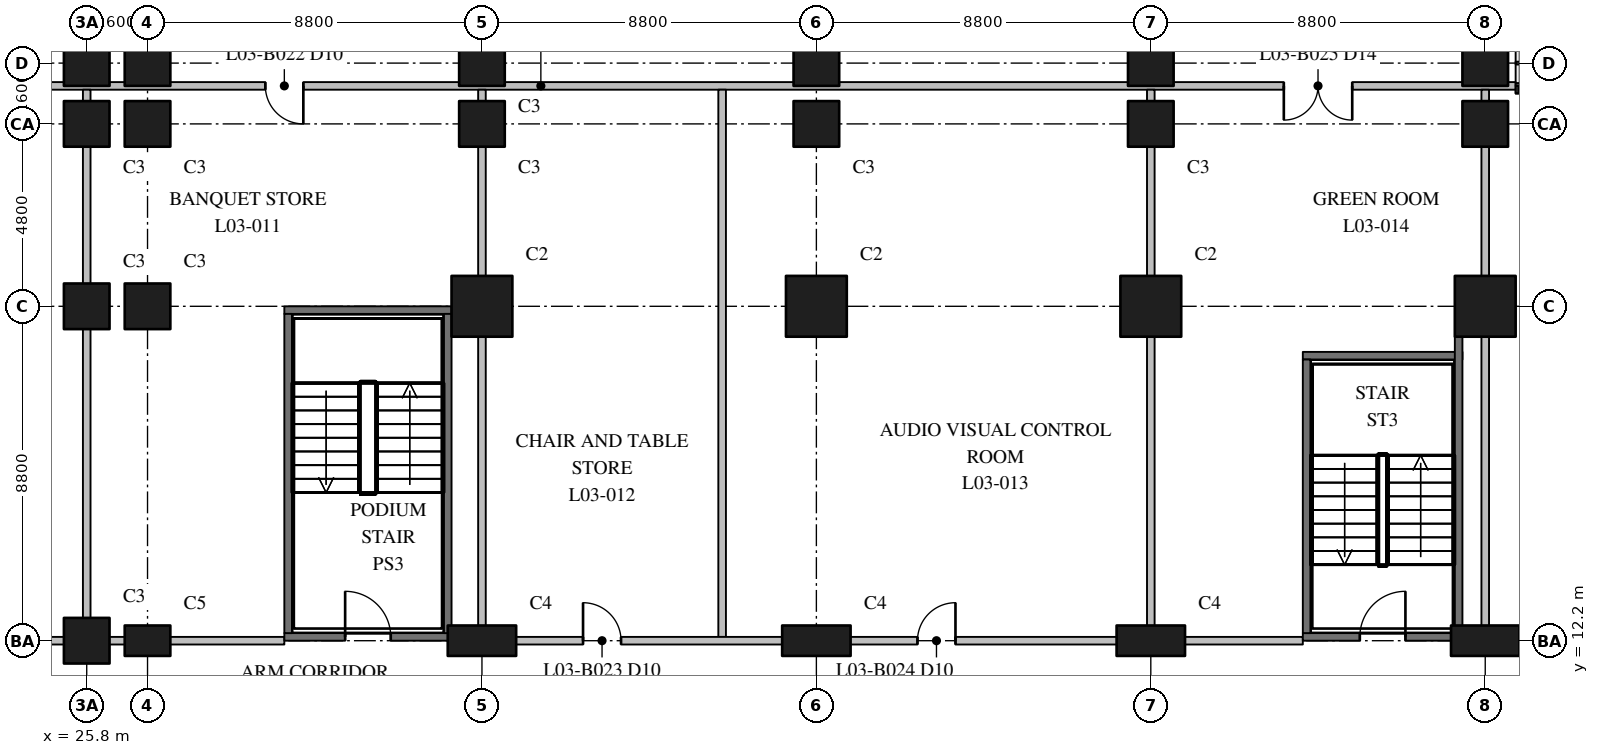
"""IFC4 building model, lengths in metres.
Left out: names, types, materials, properties, quantities, classifications, styles, units other than length and angle.
Written with IfcOpenShell. Run it as: python <this file> out.ifc"""

import sys

from ifc_helpers import new_model, si_unit, direction, frame, frame_2d, origin, origin_2d, place, context, subcontext, project, spatial, rectangle, extrude, element, fill, save


model = new_model("IFC4")
c1 = context("Model", 3, precision=1e-05, world=origin(), true_north=direction((0.0, 1.0)))
c2 = subcontext(c1, "Body", "Model", "MODEL_VIEW")
j1 = project(units=[si_unit("LENGTHUNIT", "METRE"), si_unit("PLANEANGLEUNIT", "RADIAN")], contexts=[c1])
p1 = place(None, origin())
s1 = spatial("IfcSite", under=j1, at=p1, CompositionType="ELEMENT")
p2 = place(p1, origin())
s2 = spatial("IfcBuilding", under=s1, at=p2, CompositionType="ELEMENT")
p3 = place(p2, frame((0.0, 0.0, 18.0)))
s3 = spatial("IfcBuildingStorey", under=s2, at=p3, CompositionType="ELEMENT", Elevation=18.0)
for number, where, z_axis, x_axis in (
    (1, (25.8, 12.2, 0.0), (0.0, 0.0, 1.0), (1.0, 0.0, 0.0)),
    (2, (25.8, 21.0, 0.0), (0.0, 0.0, 1.0), (1.0, 0.0, 0.0)),
    (3, (25.8, 25.8, 0.0), (0.0, 0.0, 1.0), (1.0, 0.0, 0.0)),
    (4, (25.8, 27.4, 0.0), (0.0, 0.0, 1.0), (1.0, 0.0, 0.0)),
):
    element("IfcColumn", number, at=place(p3, frame(where, z_axis=z_axis, x_axis=x_axis)), inside=s3, PredefinedType="COLUMN", context=c2, shape_type="SweptSolid", body=[
        extrude(rectangle(XDim=1.2, YDim=1.2, at=origin_2d()), origin(), (0.0, 0.0, 1.0), 5.5),
    ])
p4 = place(p3, frame((27.4, 12.2, 0.0), z_axis=(0.0, 0.0, 1.0), x_axis=(1.0, 0.0, 0.0)))
e5 = element("IfcColumn", 5, at=p4, inside=s3, PredefinedType="COLUMN", context=c2, shape_type="SweptSolid", body=[
    extrude(rectangle(XDim=1.2, YDim=0.8, at=origin_2d()), origin(), (0.0, 0.0, 1.0), 5.5),
])
for number, where, z_axis, x_axis in (
    (6, (27.4, 21.0, 0.0), (0.0, 0.0, 1.0), (1.0, 0.0, 0.0)),
    (7, (27.4, 25.8, 0.0), (0.0, 0.0, 1.0), (1.0, 0.0, 0.0)),
):
    element("IfcColumn", number, at=place(p3, frame(where, z_axis=z_axis, x_axis=x_axis)), inside=s3, PredefinedType="COLUMN", context=c2, shape_type="SweptSolid", body=[
        extrude(rectangle(XDim=1.2, YDim=1.2, at=origin_2d()), origin(), (0.0, 0.0, 1.0), 5.5),
    ])
p5 = place(p3, frame((36.2, 12.2, 0.0), z_axis=(0.0, 0.0, 1.0), x_axis=(1.0, 0.0, 0.0)))
e8 = element("IfcColumn", 8, at=p5, inside=s3, PredefinedType="COLUMN", context=c2, shape_type="SweptSolid", body=[
    extrude(rectangle(XDim=1.8, YDim=0.8, at=origin_2d()), origin(), (0.0, 0.0, 1.0), 5.5),
])
p6 = place(p3, frame((36.2, 21.0, 0.0), z_axis=(0.0, 0.0, 1.0), x_axis=(1.0, 0.0, 0.0)))
e9 = element("IfcColumn", 9, at=p6, inside=s3, PredefinedType="COLUMN", context=c2, shape_type="SweptSolid", body=[
    extrude(rectangle(XDim=1.6, YDim=1.6, at=origin_2d()), origin(), (0.0, 0.0, 1.0), 5.5),
])
p7 = place(p3, frame((36.2, 25.8, 0.0), z_axis=(0.0, 0.0, 1.0), x_axis=(1.0, 0.0, 0.0)))
e10 = element("IfcColumn", 10, at=p7, inside=s3, PredefinedType="COLUMN", context=c2, shape_type="SweptSolid", body=[
    extrude(rectangle(XDim=1.2, YDim=1.2, at=origin_2d()), origin(), (0.0, 0.0, 1.0), 5.5),
])
p8 = place(p3, frame((45.0, 12.2, 0.0), z_axis=(0.0, 0.0, 1.0), x_axis=(1.0, 0.0, 0.0)))
e11 = element("IfcColumn", 11, at=p8, inside=s3, PredefinedType="COLUMN", context=c2, shape_type="SweptSolid", body=[
    extrude(rectangle(XDim=1.8, YDim=0.8, at=origin_2d()), origin(), (0.0, 0.0, 1.0), 5.5),
])
p9 = place(p3, frame((45.0, 21.0, 0.0), z_axis=(0.0, 0.0, 1.0), x_axis=(1.0, 0.0, 0.0)))
e12 = element("IfcColumn", 12, at=p9, inside=s3, PredefinedType="COLUMN", context=c2, shape_type="SweptSolid", body=[
    extrude(rectangle(XDim=1.6, YDim=1.6, at=origin_2d()), origin(), (0.0, 0.0, 1.0), 5.5),
])
p10 = place(p3, frame((45.0, 25.8, 0.0), z_axis=(0.0, 0.0, 1.0), x_axis=(1.0, 0.0, 0.0)))
e13 = element("IfcColumn", 13, at=p10, inside=s3, PredefinedType="COLUMN", context=c2, shape_type="SweptSolid", body=[
    extrude(rectangle(XDim=1.2, YDim=1.2, at=origin_2d()), origin(), (0.0, 0.0, 1.0), 5.5),
])
p11 = place(p3, frame((53.8, 12.2, 0.0), z_axis=(0.0, 0.0, 1.0), x_axis=(1.0, 0.0, 0.0)))
e14 = element("IfcColumn", 14, at=p11, inside=s3, PredefinedType="COLUMN", context=c2, shape_type="SweptSolid", body=[
    extrude(rectangle(XDim=1.8, YDim=0.8, at=origin_2d()), origin(), (0.0, 0.0, 1.0), 5.5),
])
p12 = place(p3, frame((53.8, 21.0, 0.0), z_axis=(0.0, 0.0, 1.0), x_axis=(1.0, 0.0, 0.0)))
e15 = element("IfcColumn", 15, at=p12, inside=s3, PredefinedType="COLUMN", context=c2, shape_type="SweptSolid", body=[
    extrude(rectangle(XDim=1.6, YDim=1.6, at=origin_2d()), origin(), (0.0, 0.0, 1.0), 5.5),
])
p13 = place(p3, frame((53.8, 25.8, 0.0), z_axis=(0.0, 0.0, 1.0), x_axis=(1.0, 0.0, 0.0)))
e16 = element("IfcColumn", 16, at=p13, inside=s3, PredefinedType="COLUMN", context=c2, shape_type="SweptSolid", body=[
    extrude(rectangle(XDim=1.2, YDim=1.2, at=origin_2d()), origin(), (0.0, 0.0, 1.0), 5.5),
])
p14 = place(p3, frame((62.6, 12.2, 0.0), z_axis=(0.0, 0.0, 1.0), x_axis=(1.0, 0.0, 0.0)))
e17 = element("IfcColumn", 17, at=p14, inside=s3, PredefinedType="COLUMN", context=c2, shape_type="SweptSolid", body=[
    extrude(rectangle(XDim=1.8, YDim=0.8, at=origin_2d()), origin(), (0.0, 0.0, 1.0), 5.5),
])
p15 = place(p3, frame((62.6, 21.0, 0.0), z_axis=(0.0, 0.0, 1.0), x_axis=(1.0, 0.0, 0.0)))
e18 = element("IfcColumn", 18, at=p15, inside=s3, PredefinedType="COLUMN", context=c2, shape_type="SweptSolid", body=[
    extrude(rectangle(XDim=1.6, YDim=1.6, at=origin_2d()), origin(), (0.0, 0.0, 1.0), 5.5),
])
for number, where, z_axis, x_axis in (
    (19, (62.6, 25.8, 0.0), (0.0, 0.0, 1.0), (1.0, 0.0, 0.0)),
    (20, (27.4, 27.4, 0.0), (0.0, 0.0, 1.0), (1.0, 0.0, 0.0)),
    (21, (36.2, 27.4, 0.0), (0.0, 0.0, 1.0), (1.0, 0.0, 0.0)),
    (22, (45.0, 27.4, 0.0), (0.0, 0.0, 1.0), (1.0, 0.0, 0.0)),
    (23, (53.8, 27.4, 0.0), (0.0, 0.0, 1.0), (1.0, 0.0, 0.0)),
    (24, (62.6, 27.4, 0.0), (0.0, 0.0, 1.0), (1.0, 0.0, 0.0)),
):
    element("IfcColumn", number, at=place(p3, frame(where, z_axis=z_axis, x_axis=x_axis)), inside=s3, PredefinedType="COLUMN", context=c2, shape_type="SweptSolid", body=[
        extrude(rectangle(XDim=1.2, YDim=1.2, at=origin_2d()), origin(), (0.0, 0.0, 1.0), 5.5),
    ])
p16 = place(p3, frame((57.8, 12.3, 0.0), z_axis=(0.0, 0.0, 1.0), x_axis=(1.0, 0.0, 0.0)))
e25 = element("IfcWall", 25, at=p16, inside=s3, PredefinedType="SHEAR", context=c2, shape_type="SweptSolid", body=[
    extrude(rectangle(XDim=4.2, YDim=0.2, at=frame_2d((2.1, 0.0))), origin(), (0.0, 0.0, 1.0), 5.1),
])
p17 = place(p16, frame((1.5, 0.0, 0.0)))
e26 = element("IfcOpeningElement", 26, at=p17, cuts=e25, PredefinedType="OPENING", context=c2, shape_type="SweptSolid", body=[
    extrude(rectangle(XDim=1.2, YDim=2.1, at=frame_2d((0.6, 1.05))), frame((0.0, 0.11, 0.0), z_axis=(0.0, -1.0, 0.0), x_axis=(1.0, 0.0, 0.0)), (0.0, 0.0, 1.0), 0.22),
])
p18 = place(p3, frame((57.8, 19.7, 0.0), z_axis=(0.0, 0.0, 1.0), x_axis=(1.0, 0.0, 0.0)))
e27 = element("IfcWall", 27, at=p18, inside=s3, PredefinedType="SHEAR", context=c2, shape_type="SweptSolid", body=[
    extrude(rectangle(XDim=4.2, YDim=0.2, at=frame_2d((2.1, 0.0))), origin(), (0.0, 0.0, 1.0), 5.1),
])
p19 = place(p3, frame((57.9, 12.4, 0.0), z_axis=(0.0, 0.0, 1.0), x_axis=(0.0, 1.0, 0.0)))
e28 = element("IfcWall", 28, at=p19, inside=s3, PredefinedType="SHEAR", context=c2, shape_type="SweptSolid", body=[
    extrude(rectangle(XDim=7.2, YDim=0.2, at=frame_2d((3.6, 0.0))), origin(), (0.0, 0.0, 1.0), 5.1),
])
p20 = place(p3, frame((61.9, 12.4, 0.0), z_axis=(0.0, 0.0, 1.0), x_axis=(0.0, 1.0, 0.0)))
e29 = element("IfcWall", 29, at=p20, inside=s3, PredefinedType="SHEAR", context=c2, shape_type="SweptSolid", body=[
    extrude(rectangle(XDim=7.8, YDim=0.2, at=frame_2d((3.9, 0.0))), origin(), (0.0, 0.0, 1.0), 5.1),
])
p21 = place(p3, frame((31.0, 12.3, 0.0), z_axis=(0.0, 0.0, 1.0), x_axis=(1.0, 0.0, 0.0)))
e30 = element("IfcWall", 30, at=p21, inside=s3, PredefinedType="SHEAR", context=c2, shape_type="SweptSolid", body=[
    extrude(rectangle(XDim=4.4, YDim=0.2, at=frame_2d((2.2, 0.0))), origin(), (0.0, 0.0, 1.0), 5.1),
])
p22 = place(p21, frame((1.6, 0.0, 0.0)))
e31 = element("IfcOpeningElement", 31, at=p22, cuts=e30, PredefinedType="OPENING", context=c2, shape_type="SweptSolid", body=[
    extrude(rectangle(XDim=1.2, YDim=2.1, at=frame_2d((0.6, 1.05))), frame((0.0, 0.11, 0.0), z_axis=(0.0, -1.0, 0.0), x_axis=(1.0, 0.0, 0.0)), (0.0, 0.0, 1.0), 0.22),
])
p23 = place(p3, frame((31.0, 20.9, 0.0), z_axis=(0.0, 0.0, 1.0), x_axis=(1.0, 0.0, 0.0)))
e32 = element("IfcWall", 32, at=p23, inside=s3, PredefinedType="SHEAR", context=c2, shape_type="SweptSolid", body=[
    extrude(rectangle(XDim=4.4, YDim=0.2, at=frame_2d((2.2, 0.0))), origin(), (0.0, 0.0, 1.0), 5.1),
])
for number, where, z_axis, x_axis in (
    (33, (31.1, 12.4, 0.0), (0.0, 0.0, 1.0), (0.0, 1.0, 0.0)),
    (34, (35.3, 12.4, 0.0), (0.0, 0.0, 1.0), (0.0, 1.0, 0.0)),
):
    element("IfcWall", number, at=place(p3, frame(where, z_axis=z_axis, x_axis=x_axis)), inside=s3, PredefinedType="SHEAR", context=c2, shape_type="SweptSolid", body=[
        extrude(rectangle(XDim=8.4, YDim=0.2, at=frame_2d((4.2, 0.0))), origin(), (0.0, 0.0, 1.0), 5.1),
    ])
p24 = place(p3, frame((12.1, 12.2, 0.0), z_axis=(0.0, 0.0, 1.0), x_axis=(1.0, 0.0, 0.0)))
e35 = element("IfcWall", 35, at=p24, inside=s3, PredefinedType="PARTITIONING", context=c2, shape_type="SweptSolid", body=[
    extrude(rectangle(XDim=18.9, YDim=0.2, at=frame_2d((9.45, 0.0))), origin(), (0.0, 0.0, 1.0), 5.1),
])
p25 = place(p24, frame((3.39, 0.0, 0.0)))
e36 = element("IfcOpeningElement", 36, at=p25, cuts=e35, PredefinedType="OPENING", context=c2, shape_type="SweptSolid", body=[
    extrude(rectangle(XDim=1.8, YDim=2.4, at=frame_2d((0.9, 1.2))), frame((0.0, 0.11, 0.0), z_axis=(0.0, -1.0, 0.0), x_axis=(1.0, 0.0, 0.0)), (0.0, 0.0, 1.0), 0.22),
])
p26 = place(p24, frame((10.19, 0.0, 0.0)))
e37 = element("IfcOpeningElement", 37, at=p26, cuts=e35, PredefinedType="OPENING", context=c2, shape_type="SweptSolid", body=[
    extrude(rectangle(XDim=1.8, YDim=2.1, at=frame_2d((0.9, 1.05))), frame((0.0, 0.11, 0.0), z_axis=(0.0, -1.0, 0.0), x_axis=(1.0, 0.0, 0.0)), (0.0, 0.0, 1.0), 0.22),
])
p27 = place(p3, frame((35.4, 12.2, 0.0), z_axis=(0.0, 0.0, 1.0), x_axis=(1.0, 0.0, 0.0)))
e38 = element("IfcWall", 38, at=p27, inside=s3, PredefinedType="PARTITIONING", context=c2, shape_type="SweptSolid", body=[
    extrude(rectangle(XDim=22.4, YDim=0.2, at=frame_2d((11.2, 0.0))), origin(), (0.0, 0.0, 1.0), 5.1),
])
p28 = place(p27, frame((3.46, 0.0, 0.0)))
e39 = element("IfcOpeningElement", 39, at=p28, cuts=e38, PredefinedType="OPENING", context=c2, shape_type="SweptSolid", body=[
    extrude(rectangle(XDim=1.0, YDim=2.1, at=frame_2d((0.5, 1.05))), frame((0.0, 0.11, 0.0), z_axis=(0.0, -1.0, 0.0), x_axis=(1.0, 0.0, 0.0)), (0.0, 0.0, 1.0), 0.22),
])
p29 = place(p27, frame((12.26, 0.0, 0.0)))
e40 = element("IfcOpeningElement", 40, at=p29, cuts=e38, PredefinedType="OPENING", context=c2, shape_type="SweptSolid", body=[
    extrude(rectangle(XDim=1.0, YDim=2.1, at=frame_2d((0.5, 1.05))), frame((0.0, 0.11, 0.0), z_axis=(0.0, -1.0, 0.0), x_axis=(1.0, 0.0, 0.0)), (0.0, 0.0, 1.0), 0.22),
])
p30 = place(p3, frame((62.0, 12.2, 0.0), z_axis=(0.0, 0.0, 1.0), x_axis=(1.0, 0.0, 0.0)))
e41 = element("IfcWall", 41, at=p30, inside=s3, PredefinedType="PARTITIONING", context=c2, shape_type="SweptSolid", body=[
    extrude(rectangle(XDim=4.6, YDim=0.2, at=frame_2d((2.3, 0.0))), origin(), (0.0, 0.0, 1.0), 5.1),
])
p31 = place(p3, frame((12.1, 26.8, 0.0), z_axis=(0.0, 0.0, 1.0), x_axis=(1.0, 0.0, 0.0)))
e42 = element("IfcWall", 42, at=p31, inside=s3, PredefinedType="PARTITIONING", context=c2, shape_type="SweptSolid", body=[
    extrude(rectangle(XDim=51.3, YDim=0.2, at=frame_2d((25.65, 0.0))), origin(), (0.0, 0.0, 1.0), 5.1),
])
p32 = place(p31, frame((18.4, 0.0, 0.0)))
e43 = element("IfcOpeningElement", 43, at=p32, cuts=e42, PredefinedType="OPENING", context=c2, shape_type="SweptSolid", body=[
    extrude(rectangle(XDim=1.0, YDim=2.1, at=frame_2d((0.5, 1.05))), frame((0.0, 0.11, 0.0), z_axis=(0.0, -1.0, 0.0), x_axis=(1.0, 0.0, 0.0)), (0.0, 0.0, 1.0), 0.22),
])
p33 = place(p31, frame((45.2, 0.0, 0.0)))
e44 = element("IfcOpeningElement", 44, at=p33, cuts=e42, PredefinedType="OPENING", context=c2, shape_type="SweptSolid", body=[
    extrude(rectangle(XDim=1.8, YDim=2.4, at=frame_2d((0.9, 1.2))), frame((0.0, 0.11, 0.0), z_axis=(0.0, -1.0, 0.0), x_axis=(1.0, 0.0, 0.0)), (0.0, 0.0, 1.0), 0.22),
])
for number, where, z_axis, x_axis in (
    (45, (36.2, 12.3, 0.0), (0.0, 0.0, 1.0), (0.0, 1.0, 0.0)),
    (46, (25.8, 12.3, 0.0), (0.0, 0.0, 1.0), (0.0, 1.0, 0.0)),
    (47, (42.52, 12.3, 0.0), (0.0, 0.0, 1.0), (0.0, 1.0, 0.0)),
    (48, (53.8, 12.3, 0.0), (0.0, 0.0, 1.0), (0.0, 1.0, 0.0)),
    (49, (62.6, 12.3, 0.0), (0.0, 0.0, 1.0), (0.0, 1.0, 0.0)),
):
    element("IfcWall", number, at=place(p3, frame(where, z_axis=z_axis, x_axis=x_axis)), inside=s3, PredefinedType="PARTITIONING", context=c2, shape_type="SweptSolid", body=[
        extrude(rectangle(XDim=14.4, YDim=0.2, at=frame_2d((7.2, 0.0))), origin(), (0.0, 0.0, 1.0), 5.1),
    ])
p34 = place(p17, origin())
e50 = element("IfcDoor", 50, at=p34, inside=s3, OperationType="SINGLE_SWING_RIGHT", PredefinedType="DOOR", context=c2, shape_type="SweptSolid", body=[
    extrude(rectangle(XDim=1.2, YDim=2.1, at=frame_2d((0.6, 1.05))), frame((0.0, 0.025, 0.0), z_axis=(0.0, -1.0, 0.0), x_axis=(1.0, 0.0, 0.0)), (0.0, 0.0, 1.0), 0.05),
])
fill(e26, e50)
p35 = place(p22, origin())
e51 = element("IfcDoor", 51, at=p35, inside=s3, OperationType="SINGLE_SWING_LEFT", PredefinedType="DOOR", context=c2, shape_type="SweptSolid", body=[
    extrude(rectangle(XDim=1.2, YDim=2.1, at=frame_2d((0.6, 1.05))), frame((0.0, 0.025, 0.0), z_axis=(0.0, -1.0, 0.0), x_axis=(1.0, 0.0, 0.0)), (0.0, 0.0, 1.0), 0.05),
])
fill(e31, e51)
p36 = place(p32, frame((1.0, 0.0, 0.0), z_axis=(0.0, 0.0, 1.0), x_axis=(-1.0, 0.0, 0.0)))
e52 = element("IfcDoor", 52, at=p36, inside=s3, OperationType="SINGLE_SWING_RIGHT", PredefinedType="DOOR", context=c2, shape_type="SweptSolid", body=[
    extrude(rectangle(XDim=1.0, YDim=2.1, at=frame_2d((0.5, 1.05))), frame((0.0, 0.025, 0.0), z_axis=(0.0, -1.0, 0.0), x_axis=(1.0, 0.0, 0.0)), (0.0, 0.0, 1.0), 0.05),
])
fill(e43, e52)
p37 = place(p28, origin())
e53 = element("IfcDoor", 53, at=p37, inside=s3, OperationType="SINGLE_SWING_LEFT", PredefinedType="DOOR", context=c2, shape_type="SweptSolid", body=[
    extrude(rectangle(XDim=1.0, YDim=2.1, at=frame_2d((0.5, 1.05))), frame((0.0, 0.025, 0.0), z_axis=(0.0, -1.0, 0.0), x_axis=(1.0, 0.0, 0.0)), (0.0, 0.0, 1.0), 0.05),
])
fill(e39, e53)
p38 = place(p29, origin())
e54 = element("IfcDoor", 54, at=p38, inside=s3, OperationType="SINGLE_SWING_RIGHT", PredefinedType="DOOR", context=c2, shape_type="SweptSolid", body=[
    extrude(rectangle(XDim=1.0, YDim=2.1, at=frame_2d((0.5, 1.05))), frame((0.0, 0.025, 0.0), z_axis=(0.0, -1.0, 0.0), x_axis=(1.0, 0.0, 0.0)), (0.0, 0.0, 1.0), 0.05),
])
fill(e40, e54)
p39 = place(p33, frame((1.8, 0.0, 0.0), z_axis=(0.0, 0.0, 1.0), x_axis=(-1.0, 0.0, 0.0)))
e55 = element("IfcDoor", 55, at=p39, inside=s3, OperationType="DOUBLE_DOOR_SINGLE_SWING", PredefinedType="DOOR", context=c2, shape_type="SweptSolid", body=[
    extrude(rectangle(XDim=1.8, YDim=2.4, at=frame_2d((0.9, 1.2))), frame((0.0, 0.025, 0.0), z_axis=(0.0, -1.0, 0.0), x_axis=(1.0, 0.0, 0.0)), (0.0, 0.0, 1.0), 0.05),
])
fill(e44, e55)
save(model, sys.argv[1])
